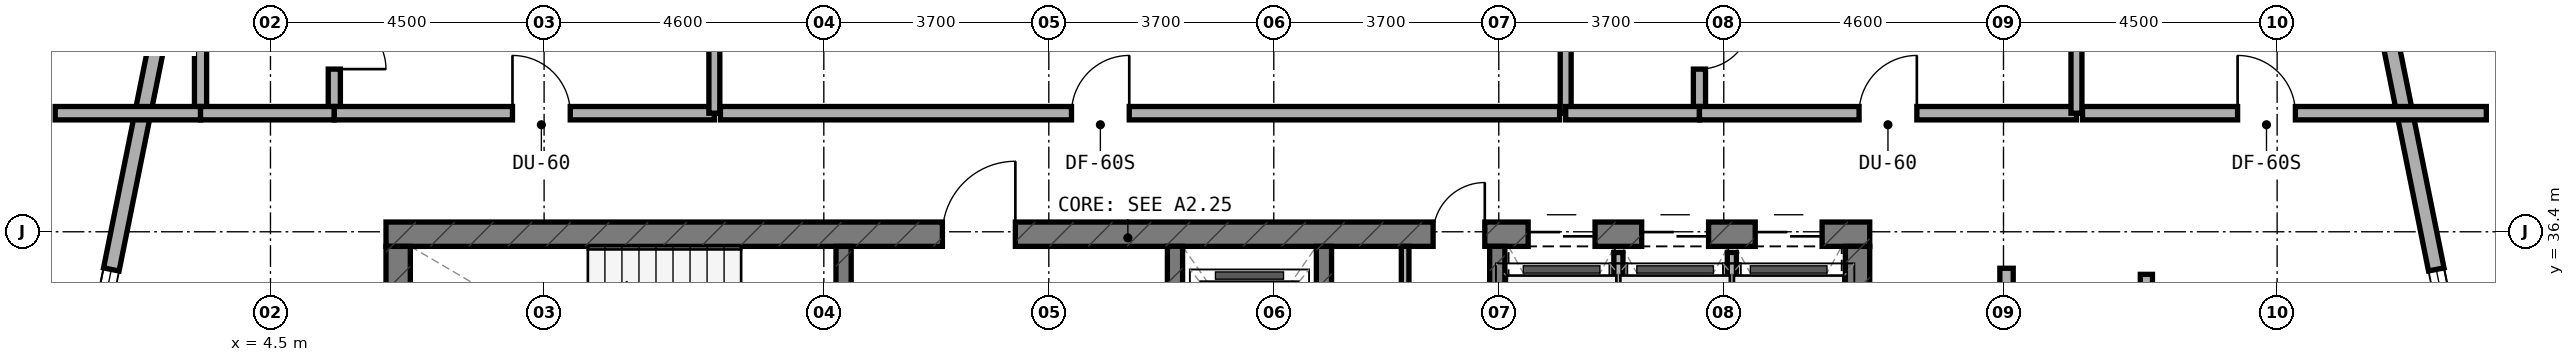
"""IFC4 building model, lengths in metres.
Left out: names, types, materials, properties, quantities, classifications, styles, units other than length and angle.
Written with IfcOpenShell. Run it as: python <this file> out.ifc"""

import sys

from ifc_helpers import new_model, si_unit, direction, frame, frame_2d, origin, place, context, subcontext, project, spatial, rectangle, extrude, element, fill, save


model = new_model("IFC4")
c1 = context("Model", 3, precision=1e-05, world=origin(), true_north=direction((0.0, 1.0)))
c2 = subcontext(c1, "Body", "Model", "MODEL_VIEW")
j1 = project(units=[si_unit("LENGTHUNIT", "METRE"), si_unit("PLANEANGLEUNIT", "RADIAN")], contexts=[c1])
p1 = place(None, origin())
s1 = spatial("IfcSite", under=j1, at=p1, CompositionType="ELEMENT")
p2 = place(p1, origin())
s2 = spatial("IfcBuilding", under=s1, at=p2, CompositionType="ELEMENT")
p3 = place(p2, frame((0.0, 0.0, 112.5)))
s3 = spatial("IfcBuildingStorey", under=s2, at=p3, CompositionType="ELEMENT", Elevation=112.5)
p4 = place(p3, frame((6.4, 36.36, 0.0), z_axis=(0.0, 0.0, 1.0), x_axis=(1.0, 0.0, 0.0)))
e1 = element("IfcWall", 1, at=p4, inside=s3, PredefinedType="SHEAR", context=c2, shape_type="SweptSolid", body=[
    extrude(rectangle(XDim=24.4, YDim=0.4, at=frame_2d((12.2, 0.0))), origin(), (0.0, 0.0, 1.0), 3.5),
])
p5 = place(p4, frame((9.15, 0.0, 0.0)))
e2 = element("IfcOpeningElement", 2, at=p5, cuts=e1, PredefinedType="OPENING", context=c2, shape_type="SweptSolid", body=[
    extrude(rectangle(XDim=1.2, YDim=2.15, at=frame_2d((0.6, 1.075))), frame((0.0, 0.21, 0.0), z_axis=(0.0, -1.0, 0.0), x_axis=(1.0, 0.0, 0.0)), (0.0, 0.0, 1.0), 0.42),
])
p6 = place(p4, frame((17.22, 0.0, 0.0)))
e3 = element("IfcOpeningElement", 3, at=p6, cuts=e1, PredefinedType="OPENING", context=c2, shape_type="SweptSolid", body=[
    extrude(rectangle(XDim=0.85, YDim=2.1, at=frame_2d((0.425, 1.05))), frame((0.0, 0.21, 0.0), z_axis=(0.0, -1.0, 0.0), x_axis=(1.0, 0.0, 0.0)), (0.0, 0.0, 1.0), 0.42),
])
p7 = place(p4, frame((18.783, 0.0, 0.0)))
e4 = element("IfcOpeningElement", 4, at=p7, cuts=e1, PredefinedType="OPENING", context=c2, shape_type="SweptSolid", body=[
    extrude(rectangle(XDim=1.1, YDim=2.15, at=frame_2d((0.55, 1.075))), frame((0.0, 0.21, 0.0), z_axis=(0.0, -1.0, 0.0), x_axis=(1.0, 0.0, 0.0)), (0.0, 0.0, 1.0), 0.42),
])
p8 = place(p4, frame((20.65, 0.0, 0.0)))
e5 = element("IfcOpeningElement", 5, at=p8, cuts=e1, PredefinedType="OPENING", context=c2, shape_type="SweptSolid", body=[
    extrude(rectangle(XDim=1.1, YDim=2.15, at=frame_2d((0.55, 1.075))), frame((0.0, 0.21, 0.0), z_axis=(0.0, -1.0, 0.0), x_axis=(1.0, 0.0, 0.0)), (0.0, 0.0, 1.0), 0.42),
])
p9 = place(p4, frame((22.517, 0.0, 0.0)))
e6 = element("IfcOpeningElement", 6, at=p9, cuts=e1, PredefinedType="OPENING", context=c2, shape_type="SweptSolid", body=[
    extrude(rectangle(XDim=1.1, YDim=2.15, at=frame_2d((0.55, 1.075))), frame((0.0, 0.21, 0.0), z_axis=(0.0, -1.0, 0.0), x_axis=(1.0, 0.0, 0.0)), (0.0, 0.0, 1.0), 0.42),
])
for number, where, z_axis, x_axis in (
    (7, (6.6, 33.0, 0.0), (0.0, 0.0, 1.0), (0.0, 1.0, 0.0)),
    (8, (30.6, 33.0, 0.0), (0.0, 0.0, 1.0), (0.0, 1.0, 0.0)),
):
    element("IfcWall", number, at=place(p3, frame(where, z_axis=z_axis, x_axis=x_axis)), inside=s3, PredefinedType="SHEAR", context=c2, shape_type="SweptSolid", body=[
        extrude(rectangle(XDim=3.16, YDim=0.4, at=frame_2d((1.58, 0.0))), origin(), (0.0, 0.0, 1.0), 3.5),
    ])
p10 = place(p3, frame((13.925, 33.0, 0.0), z_axis=(0.0, 0.0, 1.0), x_axis=(0.0, 1.0, 0.0)))
e9 = element("IfcWall", 9, at=p10, inside=s3, PredefinedType="STANDARD", context=c2, shape_type="SweptSolid", body=[
    extrude(rectangle(XDim=3.16, YDim=0.25, at=frame_2d((1.58, 0.0))), origin(), (0.0, 0.0, 1.0), 3.22),
])
p11 = place(p10, frame((0.98, 0.0, 0.0)))
e10 = element("IfcOpeningElement", 10, at=p11, cuts=e9, PredefinedType="OPENING", context=c2, shape_type="SweptSolid", body=[
    extrude(rectangle(XDim=1.1, YDim=2.15, at=frame_2d((0.55, 1.075))), frame((0.0, 0.135, 0.0), z_axis=(0.0, -1.0, 0.0), x_axis=(1.0, 0.0, 0.0)), (0.0, 0.0, 1.0), 0.27),
])
p12 = place(p3, frame((19.375, 33.0, 0.0), z_axis=(0.0, 0.0, 1.0), x_axis=(0.0, 1.0, 0.0)))
e11 = element("IfcWall", 11, at=p12, inside=s3, PredefinedType="STANDARD", context=c2, shape_type="SweptSolid", body=[
    extrude(rectangle(XDim=3.16, YDim=0.25, at=frame_2d((1.58, 0.0))), origin(), (0.0, 0.0, 1.0), 3.22),
])
p13 = place(p12, frame((0.98, 0.0, 0.0)))
e12 = element("IfcOpeningElement", 12, at=p13, cuts=e11, PredefinedType="OPENING", context=c2, shape_type="SweptSolid", body=[
    extrude(rectangle(XDim=1.1, YDim=2.15, at=frame_2d((0.55, 1.075))), frame((0.0, 0.135, 0.0), z_axis=(0.0, -1.0, 0.0), x_axis=(1.0, 0.0, 0.0)), (0.0, 0.0, 1.0), 0.27),
])
for number, where, z_axis, x_axis in (
    (13, (21.825, 33.0, 0.0), (0.0, 0.0, 1.0), (0.0, 1.0, 0.0)),
    (14, (24.675, 33.0, 0.0), (0.0, 0.0, 1.0), (0.0, 1.0, 0.0)),
):
    element("IfcWall", number, at=place(p3, frame(where, z_axis=z_axis, x_axis=x_axis)), inside=s3, PredefinedType="STANDARD", context=c2, shape_type="SweptSolid", body=[
        extrude(rectangle(XDim=3.16, YDim=0.25, at=frame_2d((1.58, 0.0))), origin(), (0.0, 0.0, 1.0), 3.22),
    ])
p14 = place(p3, frame((41.084, 30.98, 0.0), z_axis=(0.0, 0.0, 1.0), x_axis=(-0.197435082048, 0.980315963543, 0.0)))
e15 = element("IfcWall", 15, at=p14, inside=s3, PredefinedType="STANDARD", context=c2, shape_type="SweptSolid", body=[
    extrude(rectangle(XDim=9.183, YDim=0.26, at=frame_2d((4.591, 0.0))), origin(), (0.0, 0.0, 1.0), 3.22),
])
p15 = place(p14, frame((2.497, 0.0, 0.8)))
e16 = element("IfcOpeningElement", 16, at=p15, cuts=e15, PredefinedType="OPENING", context=c2, shape_type="SweptSolid", body=[
    extrude(rectangle(XDim=2.4, YDim=1.6, at=frame_2d((1.2, 0.8))), frame((0.0, 0.14, 0.0), z_axis=(0.0, -1.0, 0.0), x_axis=(1.0, 0.0, 0.0)), (0.0, 0.0, 1.0), 0.28),
])
p16 = place(p3, frame((2.729, 39.982, 0.0), z_axis=(0.0, 0.0, 1.0), x_axis=(-0.197435082048, -0.980315963543, 0.0)))
e17 = element("IfcWall", 17, at=p16, inside=s3, PredefinedType="STANDARD", context=c2, shape_type="SweptSolid", body=[
    extrude(rectangle(XDim=9.183, YDim=0.26, at=frame_2d((4.591, 0.0))), origin(), (0.0, 0.0, 1.0), 3.22),
])
p17 = place(p16, frame((4.286, 0.0, 0.8)))
e18 = element("IfcOpeningElement", 18, at=p17, cuts=e17, PredefinedType="OPENING", context=c2, shape_type="SweptSolid", body=[
    extrude(rectangle(XDim=2.4, YDim=1.6, at=frame_2d((1.2, 0.8))), frame((0.0, 0.14, 0.0), z_axis=(0.0, -1.0, 0.0), x_axis=(1.0, 0.0, 0.0)), (0.0, 0.0, 1.0), 0.28),
])
p18 = place(p3, frame((23.16, 34.82, 0.0), z_axis=(0.0, 0.0, 1.0), x_axis=(0.0, 1.0, 0.0)))
e19 = element("IfcWall", 19, at=p18, inside=s3, PredefinedType="PARTITIONING", context=c2, shape_type="SweptSolid", body=[
    extrude(rectangle(XDim=1.34, YDim=0.125, at=frame_2d((0.67, 0.0))), origin(), (0.0, 0.0, 1.0), 3.22),
])
p19 = place(p3, frame((26.667, 33.1, 0.0), z_axis=(0.0, 0.0, 1.0), x_axis=(0.0, 1.0, 0.0)))
e20 = element("IfcWall", 20, at=p19, inside=s3, PredefinedType="PARTITIONING", context=c2, shape_type="SweptSolid", body=[
    extrude(rectangle(XDim=2.96, YDim=0.15, at=frame_2d((1.48, 0.0))), origin(), (0.0, 0.0, 1.0), 3.22),
])
p20 = place(p3, frame((28.533, 33.1, 0.0), z_axis=(0.0, 0.0, 1.0), x_axis=(0.0, 1.0, 0.0)))
e21 = element("IfcWall", 21, at=p20, inside=s3, PredefinedType="PARTITIONING", context=c2, shape_type="SweptSolid", body=[
    extrude(rectangle(XDim=2.96, YDim=0.15, at=frame_2d((1.48, 0.0))), origin(), (0.0, 0.0, 1.0), 2.695),
])
p21 = place(p3, frame((5.55, 38.45, 0.0), z_axis=(0.0, 0.0, 1.0), x_axis=(0.0, 1.0, 0.0)))
e22 = element("IfcWall", 22, at=p21, inside=s3, PredefinedType="PLUMBINGWALL", context=c2, shape_type="SweptSolid", body=[
    extrude(rectangle(XDim=2.1, YDim=0.2, at=frame_2d((1.05, 0.0))), origin(), (0.0, 0.0, 1.0), 3.22),
])
p22 = place(p21, frame((0.625, 0.0, 0.0)))
e23 = element("IfcOpeningElement", 23, at=p22, cuts=e22, PredefinedType="OPENING", context=c2, shape_type="SweptSolid", body=[
    extrude(rectangle(XDim=0.85, YDim=2.1, at=frame_2d((0.425, 1.05))), frame((0.0, 0.11, 0.0), z_axis=(0.0, -1.0, 0.0), x_axis=(1.0, 0.0, 0.0)), (0.0, 0.0, 1.0), 0.22),
])
p23 = place(p3, frame((3.35, 38.45, 0.0), z_axis=(0.0, 0.0, 1.0), x_axis=(0.0, 1.0, 0.0)))
e24 = element("IfcWall", 24, at=p23, inside=s3, PredefinedType="PLUMBINGWALL", context=c2, shape_type="SweptSolid", body=[
    extrude(rectangle(XDim=2.1, YDim=0.2, at=frame_2d((1.05, 0.0))), origin(), (0.0, 0.0, 1.0), 3.22),
])
p24 = place(p3, frame((0.96, 38.35, 0.0), z_axis=(0.0, 0.0, 1.0), x_axis=(1.0, 0.0, 0.0)))
e25 = element("IfcWall", 25, at=p24, inside=s3, PredefinedType="SOLIDWALL", context=c2, shape_type="SweptSolid", body=[
    extrude(rectangle(XDim=2.39, YDim=0.22, at=frame_2d((1.195, 0.0))), origin(), (0.0, 0.0, 1.0), 3.22),
])
p25 = place(p3, frame((3.35, 38.35, 0.0), z_axis=(0.0, 0.0, 1.0), x_axis=(1.0, 0.0, 0.0)))
e26 = element("IfcWall", 26, at=p25, inside=s3, PredefinedType="SOLIDWALL", context=c2, shape_type="SweptSolid", body=[
    extrude(rectangle(XDim=2.2, YDim=0.22, at=frame_2d((1.1, 0.0))), origin(), (0.0, 0.0, 1.0), 3.22),
])
p26 = place(p3, frame((5.55, 38.35, 0.0), z_axis=(0.0, 0.0, 1.0), x_axis=(1.0, 0.0, 0.0)))
e27 = element("IfcWall", 27, at=p26, inside=s3, PredefinedType="SOLIDWALL", context=c2, shape_type="SweptSolid", body=[
    extrude(rectangle(XDim=6.25, YDim=0.22, at=frame_2d((3.125, 0.0))), origin(), (0.0, 0.0, 1.0), 2.695),
])
p27 = place(p26, frame((2.93, 0.0, 0.0)))
e28 = element("IfcOpeningElement", 28, at=p27, cuts=e27, PredefinedType="OPENING", context=c2, shape_type="SweptSolid", body=[
    extrude(rectangle(XDim=0.95, YDim=2.1, at=frame_2d((0.475, 1.05))), frame((0.0, 0.12, 0.0), z_axis=(0.0, -1.0, 0.0), x_axis=(1.0, 0.0, 0.0)), (0.0, 0.0, 1.0), 0.24),
])
p28 = place(p3, frame((11.8, 38.35, 0.0), z_axis=(0.0, 0.0, 1.0), x_axis=(0.0, 1.0, 0.0)))
e29 = element("IfcWall", 29, at=p28, inside=s3, PredefinedType="SOLIDWALL", context=c2, shape_type="SweptSolid", body=[
    extrude(rectangle(XDim=6.157, YDim=0.18, at=frame_2d((3.079, 0.0))), origin(), (0.0, 0.0, 1.0), 2.835),
])
p29 = place(p3, frame((11.9, 38.35, 0.0), z_axis=(0.0, 0.0, 1.0), x_axis=(1.0, 0.0, 0.0)))
e30 = element("IfcWall", 30, at=p29, inside=s3, PredefinedType="SOLIDWALL", context=c2, shape_type="SweptSolid", body=[
    extrude(rectangle(XDim=13.8, YDim=0.22, at=frame_2d((6.9, 0.0))), origin(), (0.0, 0.0, 1.0), 2.695),
])
p30 = place(p29, frame((5.773, 0.0, 0.0)))
e31 = element("IfcOpeningElement", 31, at=p30, cuts=e30, PredefinedType="OPENING", context=c2, shape_type="SweptSolid", body=[
    extrude(rectangle(XDim=0.95, YDim=2.1, at=frame_2d((0.475, 1.05))), frame((0.0, 0.12, 0.0), z_axis=(0.0, -1.0, 0.0), x_axis=(1.0, 0.0, 0.0)), (0.0, 0.0, 1.0), 0.24),
])
p31 = place(p3, frame((25.8, 38.35, 0.0), z_axis=(0.0, 0.0, 1.0), x_axis=(0.0, 1.0, 0.0)))
e32 = element("IfcWall", 32, at=p31, inside=s3, PredefinedType="SOLIDWALL", context=c2, shape_type="SweptSolid", body=[
    extrude(rectangle(XDim=6.79, YDim=0.18, at=frame_2d((3.395, 0.0))), origin(), (0.0, 0.0, 1.0), 2.695),
])
p32 = place(p3, frame((28.0, 38.45, 0.0), z_axis=(0.0, 0.0, 1.0), x_axis=(0.0, 1.0, 0.0)))
e33 = element("IfcWall", 33, at=p32, inside=s3, PredefinedType="PLUMBINGWALL", context=c2, shape_type="SweptSolid", body=[
    extrude(rectangle(XDim=2.1, YDim=0.2, at=frame_2d((1.05, 0.0))), origin(), (0.0, 0.0, 1.0), 2.835),
])
p33 = place(p32, frame((0.625, 0.0, 0.0)))
e34 = element("IfcOpeningElement", 34, at=p33, cuts=e33, PredefinedType="OPENING", context=c2, shape_type="SweptSolid", body=[
    extrude(rectangle(XDim=0.85, YDim=2.1, at=frame_2d((0.425, 1.05))), frame((0.0, 0.11, 0.0), z_axis=(0.0, -1.0, 0.0), x_axis=(1.0, 0.0, 0.0)), (0.0, 0.0, 1.0), 0.22),
])
p34 = place(p3, frame((25.8, 38.35, 0.0), z_axis=(0.0, 0.0, 1.0), x_axis=(1.0, 0.0, 0.0)))
e35 = element("IfcWall", 35, at=p34, inside=s3, PredefinedType="SOLIDWALL", context=c2, shape_type="SweptSolid", body=[
    extrude(rectangle(XDim=2.2, YDim=0.22, at=frame_2d((1.1, 0.0))), origin(), (0.0, 0.0, 1.0), 2.695),
])
p35 = place(p3, frame((28.0, 38.35, 0.0), z_axis=(0.0, 0.0, 1.0), x_axis=(1.0, 0.0, 0.0)))
e36 = element("IfcWall", 36, at=p35, inside=s3, PredefinedType="SOLIDWALL", context=c2, shape_type="SweptSolid", body=[
    extrude(rectangle(XDim=6.2, YDim=0.22, at=frame_2d((3.1, 0.0))), origin(), (0.0, 0.0, 1.0), 2.695),
])
p36 = place(p35, frame((2.625, 0.0, 0.0)))
e37 = element("IfcOpeningElement", 37, at=p36, cuts=e36, PredefinedType="OPENING", context=c2, shape_type="SweptSolid", body=[
    extrude(rectangle(XDim=0.95, YDim=2.1, at=frame_2d((0.475, 1.05))), frame((0.0, 0.12, 0.0), z_axis=(0.0, -1.0, 0.0), x_axis=(1.0, 0.0, 0.0)), (0.0, 0.0, 1.0), 0.24),
])
p37 = place(p3, frame((34.2, 38.35, 0.0), z_axis=(0.0, 0.0, 1.0), x_axis=(0.0, 1.0, 0.0)))
e38 = element("IfcWall", 38, at=p37, inside=s3, PredefinedType="SOLIDWALL", context=c2, shape_type="SweptSolid", body=[
    extrude(rectangle(XDim=5.351, YDim=0.18, at=frame_2d((2.675, 0.0))), origin(), (0.0, 0.0, 1.0), 2.695),
])
p38 = place(p3, frame((34.3, 38.35, 0.0), z_axis=(0.0, 0.0, 1.0), x_axis=(1.0, 0.0, 0.0)))
e39 = element("IfcWall", 39, at=p38, inside=s3, PredefinedType="SOLIDWALL", context=c2, shape_type="SweptSolid", body=[
    extrude(rectangle(XDim=6.64, YDim=0.22, at=frame_2d((3.32, 0.0))), origin(), (0.0, 0.0, 1.0), 2.835),
])
p39 = place(p38, frame((2.55, 0.0, 0.0)))
e40 = element("IfcOpeningElement", 40, at=p39, cuts=e39, PredefinedType="OPENING", context=c2, shape_type="SweptSolid", body=[
    extrude(rectangle(XDim=0.95, YDim=2.1, at=frame_2d((0.475, 1.05))), frame((0.0, 0.12, 0.0), z_axis=(0.0, -1.0, 0.0), x_axis=(1.0, 0.0, 0.0)), (0.0, 0.0, 1.0), 0.24),
])
p40 = place(p3, frame((35.35, 33.7, 0.0), z_axis=(0.0, 0.0, 1.0), x_axis=(0.0, 1.0, 0.0)))
e41 = element("IfcWall", 41, at=p40, inside=s3, PredefinedType="PLUMBINGWALL", context=c2, shape_type="SweptSolid", body=[
    extrude(rectangle(XDim=2.0, YDim=0.2, at=frame_2d((1.0, 0.0))), origin(), (0.0, 0.0, 1.0), 2.835),
])
p41 = place(p3, frame((33.05, 33.6, 0.0), z_axis=(0.0, 0.0, 1.0), x_axis=(0.0, 1.0, 0.0)))
e42 = element("IfcWall", 42, at=p41, inside=s3, PredefinedType="SOLIDWALL", context=c2, shape_type="SweptSolid", body=[
    extrude(rectangle(XDim=2.2, YDim=0.22, at=frame_2d((1.1, 0.0))), origin(), (0.0, 0.0, 1.0), 3.22),
])
p42 = place(p15, origin())
e43 = element("IfcWindow", 43, at=p42, inside=s3, PartitioningType="SINGLE_PANEL", PredefinedType="WINDOW", context=c2, shape_type="SweptSolid", body=[
    extrude(rectangle(XDim=2.4, YDim=1.6, at=frame_2d((1.2, 0.8))), frame((0.0, 0.03, 0.0), z_axis=(0.0, -1.0, 0.0), x_axis=(1.0, 0.0, 0.0)), (0.0, 0.0, 1.0), 0.06),
])
fill(e16, e43)
p43 = place(p17, origin())
e44 = element("IfcWindow", 44, at=p43, inside=s3, PartitioningType="SINGLE_PANEL", PredefinedType="WINDOW", context=c2, shape_type="SweptSolid", body=[
    extrude(rectangle(XDim=2.4, YDim=1.6, at=frame_2d((1.2, 0.8))), frame((0.0, 0.03, 0.0), z_axis=(0.0, -1.0, 0.0), x_axis=(1.0, 0.0, 0.0)), (0.0, 0.0, 1.0), 0.06),
])
fill(e18, e44)
p44 = place(p5, origin())
e45 = element("IfcDoor", 45, at=p44, inside=s3, OperationType="SINGLE_SWING_RIGHT", PredefinedType="DOOR", context=c2, shape_type="SweptSolid", body=[
    extrude(rectangle(XDim=1.2, YDim=2.15, at=frame_2d((0.6, 1.075))), frame((0.0, 0.025, 0.0), z_axis=(0.0, -1.0, 0.0), x_axis=(1.0, 0.0, 0.0)), (0.0, 0.0, 1.0), 0.05),
])
fill(e2, e45)
p45 = place(p6, origin())
e46 = element("IfcDoor", 46, at=p45, inside=s3, OperationType="SINGLE_SWING_RIGHT", PredefinedType="DOOR", context=c2, shape_type="SweptSolid", body=[
    extrude(rectangle(XDim=0.85, YDim=2.1, at=frame_2d((0.425, 1.05))), frame((0.0, 0.025, 0.0), z_axis=(0.0, -1.0, 0.0), x_axis=(1.0, 0.0, 0.0)), (0.0, 0.0, 1.0), 0.05),
])
fill(e3, e46)
p46 = place(p7, origin())
e47 = element("IfcDoor", 47, at=p46, inside=s3, OperationType="DOUBLE_DOOR_SLIDING", PredefinedType="DOOR", context=c2, shape_type="SweptSolid", body=[
    extrude(rectangle(XDim=1.1, YDim=2.15, at=frame_2d((0.55, 1.075))), frame((0.0, 0.025, 0.0), z_axis=(0.0, -1.0, 0.0), x_axis=(1.0, 0.0, 0.0)), (0.0, 0.0, 1.0), 0.05),
])
fill(e4, e47)
p47 = place(p8, origin())
e48 = element("IfcDoor", 48, at=p47, inside=s3, OperationType="DOUBLE_DOOR_SLIDING", PredefinedType="DOOR", context=c2, shape_type="SweptSolid", body=[
    extrude(rectangle(XDim=1.1, YDim=2.15, at=frame_2d((0.55, 1.075))), frame((0.0, 0.025, 0.0), z_axis=(0.0, -1.0, 0.0), x_axis=(1.0, 0.0, 0.0)), (0.0, 0.0, 1.0), 0.05),
])
fill(e5, e48)
p48 = place(p9, origin())
e49 = element("IfcDoor", 49, at=p48, inside=s3, OperationType="DOUBLE_DOOR_SLIDING", PredefinedType="DOOR", context=c2, shape_type="SweptSolid", body=[
    extrude(rectangle(XDim=1.1, YDim=2.15, at=frame_2d((0.55, 1.075))), frame((0.0, 0.025, 0.0), z_axis=(0.0, -1.0, 0.0), x_axis=(1.0, 0.0, 0.0)), (0.0, 0.0, 1.0), 0.05),
])
fill(e6, e49)
p49 = place(p22, frame((0.85, 0.0, 0.0), z_axis=(0.0, 0.0, 1.0), x_axis=(-1.0, 0.0, 0.0)))
e50 = element("IfcDoor", 50, at=p49, inside=s3, OperationType="SINGLE_SWING_RIGHT", PredefinedType="DOOR", context=c2, shape_type="SweptSolid", body=[
    extrude(rectangle(XDim=0.85, YDim=2.1, at=frame_2d((0.425, 1.05))), frame((0.0, 0.025, 0.0), z_axis=(0.0, -1.0, 0.0), x_axis=(1.0, 0.0, 0.0)), (0.0, 0.0, 1.0), 0.05),
])
fill(e23, e50)
p50 = place(p27, origin())
e51 = element("IfcDoor", 51, at=p50, inside=s3, OperationType="SINGLE_SWING_LEFT", PredefinedType="DOOR", context=c2, shape_type="SweptSolid", body=[
    extrude(rectangle(XDim=0.95, YDim=2.1, at=frame_2d((0.475, 1.05))), frame((0.0, 0.025, 0.0), z_axis=(0.0, -1.0, 0.0), x_axis=(1.0, 0.0, 0.0)), (0.0, 0.0, 1.0), 0.05),
])
fill(e28, e51)
p51 = place(p30, origin())
e52 = element("IfcDoor", 52, at=p51, inside=s3, OperationType="SINGLE_SWING_RIGHT", PredefinedType="DOOR", context=c2, shape_type="SweptSolid", body=[
    extrude(rectangle(XDim=0.95, YDim=2.1, at=frame_2d((0.475, 1.05))), frame((0.0, 0.025, 0.0), z_axis=(0.0, -1.0, 0.0), x_axis=(1.0, 0.0, 0.0)), (0.0, 0.0, 1.0), 0.05),
])
fill(e31, e52)
p52 = place(p33, frame((0.85, 0.0, 0.0), z_axis=(0.0, 0.0, 1.0), x_axis=(-1.0, 0.0, 0.0)))
e53 = element("IfcDoor", 53, at=p52, inside=s3, OperationType="SINGLE_SWING_LEFT", PredefinedType="DOOR", context=c2, shape_type="SweptSolid", body=[
    extrude(rectangle(XDim=0.85, YDim=2.1, at=frame_2d((0.425, 1.05))), frame((0.0, 0.025, 0.0), z_axis=(0.0, -1.0, 0.0), x_axis=(1.0, 0.0, 0.0)), (0.0, 0.0, 1.0), 0.05),
])
fill(e34, e53)
p53 = place(p36, origin())
e54 = element("IfcDoor", 54, at=p53, inside=s3, OperationType="SINGLE_SWING_RIGHT", PredefinedType="DOOR", context=c2, shape_type="SweptSolid", body=[
    extrude(rectangle(XDim=0.95, YDim=2.1, at=frame_2d((0.475, 1.05))), frame((0.0, 0.025, 0.0), z_axis=(0.0, -1.0, 0.0), x_axis=(1.0, 0.0, 0.0)), (0.0, 0.0, 1.0), 0.05),
])
fill(e37, e54)
p54 = place(p39, origin())
e55 = element("IfcDoor", 55, at=p54, inside=s3, OperationType="SINGLE_SWING_LEFT", PredefinedType="DOOR", context=c2, shape_type="SweptSolid", body=[
    extrude(rectangle(XDim=0.95, YDim=2.1, at=frame_2d((0.475, 1.05))), frame((0.0, 0.025, 0.0), z_axis=(0.0, -1.0, 0.0), x_axis=(1.0, 0.0, 0.0)), (0.0, 0.0, 1.0), 0.05),
])
fill(e40, e55)
save(model, sys.argv[1])
